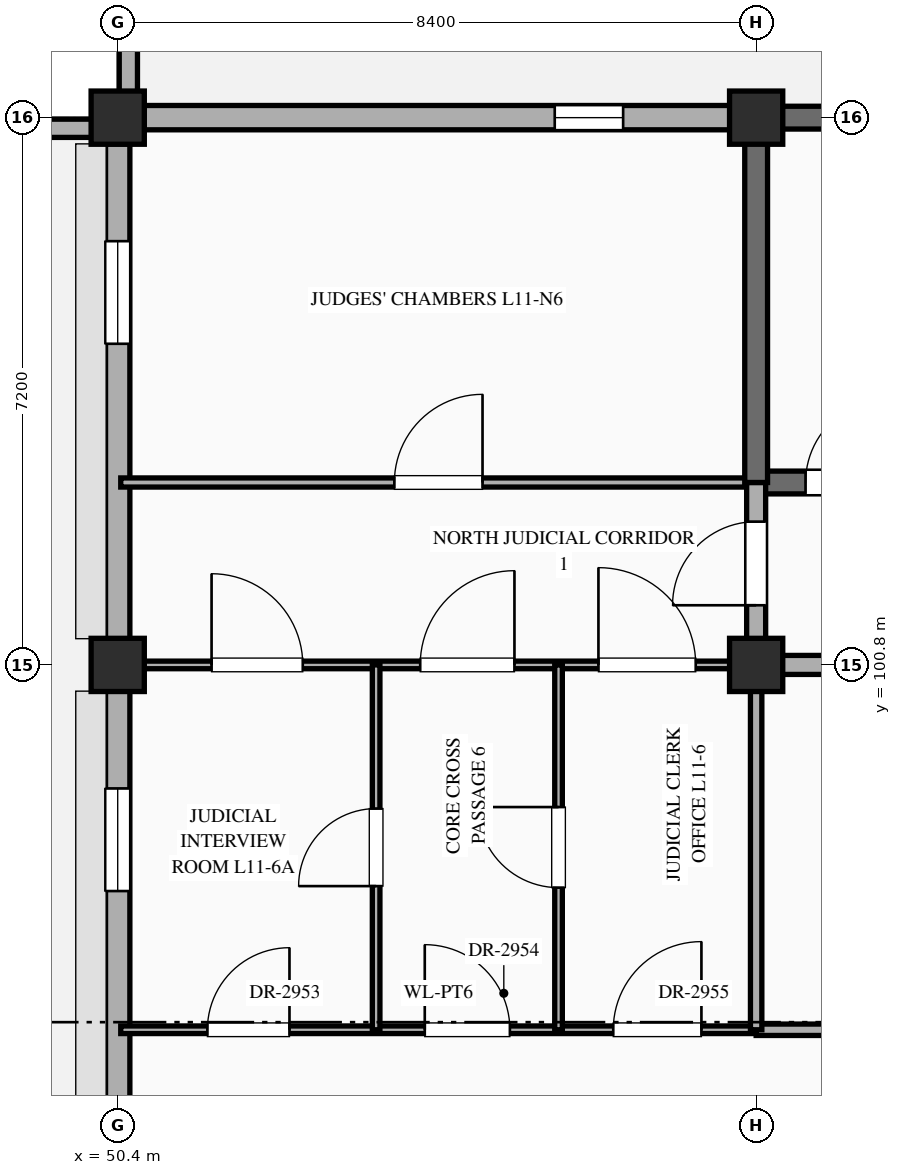
"""IFC4 building model, lengths in metres.
Left out: names, types, materials, properties, quantities, classifications, styles, units other than length and angle.
Written with IfcOpenShell. Run it as: python <this file> out.ifc"""

import sys

from ifc_helpers import new_model, si_unit, direction, frame, frame_2d, origin, origin_2d, place, context, subcontext, project, spatial, rectangle, extrude, element, fill, save


model = new_model("IFC4")
c1 = context("Model", 3, precision=1e-05, world=origin(), true_north=direction((0.0, 1.0)))
c2 = subcontext(c1, "Body", "Model", "MODEL_VIEW")
j1 = project(units=[si_unit("LENGTHUNIT", "METRE"), si_unit("PLANEANGLEUNIT", "RADIAN")], contexts=[c1])
p1 = place(None, origin())
s1 = spatial("IfcSite", under=j1, at=p1, CompositionType="ELEMENT")
p2 = place(p1, origin())
s2 = spatial("IfcBuilding", under=s1, at=p2, CompositionType="ELEMENT")
p3 = place(p2, frame((0.0, 0.0, 47.7)))
s3 = spatial("IfcBuildingStorey", under=s2, at=p3, CompositionType="ELEMENT", Elevation=47.7)
for number, where, z_axis, x_axis in (
    (1, (50.4, 100.8, 0.0), (0.0, 0.0, 1.0), (1.0, 0.0, 0.0)),
    (2, (50.4, 108.0, 0.0), (0.0, 0.0, 1.0), (1.0, 0.0, 0.0)),
    (3, (58.8, 100.8, 0.0), (0.0, 0.0, 1.0), (1.0, 0.0, 0.0)),
    (4, (58.8, 108.0, 0.0), (0.0, 0.0, 1.0), (1.0, 0.0, 0.0)),
):
    element("IfcColumn", number, at=place(p3, frame(where, z_axis=z_axis, x_axis=x_axis)), inside=s3, PredefinedType="COLUMN", context=c2, shape_type="SweptSolid", body=[
        extrude(rectangle(XDim=0.7, YDim=0.7, at=origin_2d()), origin(), (0.0, 0.0, 1.0), 4.2),
    ])
p4 = place(p3, frame((50.4, 93.945, 0.0), z_axis=(0.0, 0.0, 1.0), x_axis=(0.0, 1.0, 0.0)))
e5 = element("IfcWall", 5, at=p4, inside=s3, PredefinedType="STANDARD", context=c2, shape_type="SweptSolid", body=[
    extrude(rectangle(XDim=6.51, YDim=0.32, at=frame_2d((3.255, 0.0))), origin(), (0.0, 0.0, 1.0), 3.31),
])
p5 = place(p4, frame((3.88, 0.0, 0.55)))
e6 = element("IfcOpeningElement", 6, at=p5, cuts=e5, PredefinedType="OPENING", context=c2, shape_type="SweptSolid", body=[
    extrude(rectangle(XDim=1.35, YDim=1.2, at=frame_2d((0.675, 0.6))), frame((0.0, 0.172, 0.0), z_axis=(0.0, -1.0, 0.0), x_axis=(1.0, 0.0, 0.0)), (0.0, 0.0, 1.0), 0.344),
])
p6 = place(p3, frame((50.745, 108.0, 0.0), z_axis=(0.0, 0.0, 1.0), x_axis=(1.0, 0.0, 0.0)))
e7 = element("IfcWall", 7, at=p6, inside=s3, PredefinedType="STANDARD", context=c2, shape_type="SweptSolid", body=[
    extrude(rectangle(XDim=7.71, YDim=0.32, at=frame_2d((3.855, 0.0))), origin(), (0.0, 0.0, 1.0), 3.31),
])
p7 = place(p6, frame((5.405, 0.0, 0.55)))
e8 = element("IfcOpeningElement", 8, at=p7, cuts=e7, PredefinedType="OPENING", context=c2, shape_type="SweptSolid", body=[
    extrude(rectangle(XDim=0.9, YDim=1.38, at=frame_2d((0.45, 0.69))), frame((0.0, 0.172, 0.0), z_axis=(0.0, -1.0, 0.0), x_axis=(1.0, 0.0, 0.0)), (0.0, 0.0, 1.0), 0.344),
])
p8 = place(p3, frame((50.4, 101.145, 0.0), z_axis=(0.0, 0.0, 1.0), x_axis=(0.0, 1.0, 0.0)))
e9 = element("IfcWall", 9, at=p8, inside=s3, PredefinedType="STANDARD", context=c2, shape_type="SweptSolid", body=[
    extrude(rectangle(XDim=6.51, YDim=0.32, at=frame_2d((3.255, 0.0))), origin(), (0.0, 0.0, 1.0), 3.31),
])
p9 = place(p8, frame((3.88, 0.0, 0.55)))
e10 = element("IfcOpeningElement", 10, at=p9, cuts=e9, PredefinedType="OPENING", context=c2, shape_type="SweptSolid", body=[
    extrude(rectangle(XDim=1.35, YDim=1.38, at=frame_2d((0.675, 0.69))), frame((0.0, 0.172, 0.0), z_axis=(0.0, -1.0, 0.0), x_axis=(1.0, 0.0, 0.0)), (0.0, 0.0, 1.0), 0.344),
])
p10 = place(p3, frame((59.145, 108.0, 0.0), z_axis=(0.0, 0.0, 1.0), x_axis=(1.0, 0.0, 0.0)))
e11 = element("IfcWall", 11, at=p10, inside=s3, PredefinedType="SHEAR", context=c2, shape_type="SweptSolid", body=[
    extrude(rectangle(XDim=7.71, YDim=0.3, at=frame_2d((3.855, 0.0))), origin(), (0.0, 0.0, 1.0), 3.96),
])
p11 = place(p3, frame((50.1, 107.86, 0.0), z_axis=(0.0, 0.0, 1.0), x_axis=(-1.0, 0.0, 0.0)))
e12 = element("IfcWall", 12, at=p11, inside=s3, PredefinedType="PARAPET", context=c2, shape_type="SweptSolid", body=[
    extrude(rectangle(XDim=7.96, YDim=0.24, at=frame_2d((3.98, 0.0))), origin(), (0.0, 0.0, 1.0), 1.2),
])
p12 = place(p3, frame((50.54, 115.06, 0.0), z_axis=(0.0, 0.0, 1.0), x_axis=(0.0, -1.0, 0.0)))
e13 = element("IfcWall", 13, at=p12, inside=s3, PredefinedType="PARAPET", context=c2, shape_type="SweptSolid", body=[
    extrude(rectangle(XDim=6.76, YDim=0.24, at=frame_2d((3.38, 0.0))), origin(), (0.0, 0.0, 1.0), 1.2),
])
p13 = place(p3, frame((50.44, 96.0, 0.0), z_axis=(0.0, 0.0, 1.0), x_axis=(1.0, 0.0, 0.0)))
e14 = element("IfcWall", 14, at=p13, inside=s3, PredefinedType="STANDARD", context=c2, shape_type="SweptSolid", body=[
    extrude(rectangle(XDim=8.36, YDim=0.1, at=frame_2d((4.18, 0.0))), origin(), (0.0, 0.0, 1.0), 3.96),
])
p14 = place(p13, frame((1.14, 0.0, 0.0)))
e15 = element("IfcOpeningElement", 15, at=p14, cuts=e14, PredefinedType="OPENING", context=c2, shape_type="SweptSolid", body=[
    extrude(rectangle(XDim=1.08, YDim=2.25, at=frame_2d((0.54, 1.125))), frame((0.0, 0.062, 0.0), z_axis=(0.0, -1.0, 0.0), x_axis=(1.0, 0.0, 0.0)), (0.0, 0.0, 1.0), 0.124),
])
p15 = place(p13, frame((4.0, 0.0, 0.0)))
e16 = element("IfcOpeningElement", 16, at=p15, cuts=e14, PredefinedType="OPENING", context=c2, shape_type="SweptSolid", body=[
    extrude(rectangle(XDim=1.12, YDim=2.25, at=frame_2d((0.56, 1.125))), frame((0.0, 0.062, 0.0), z_axis=(0.0, -1.0, 0.0), x_axis=(1.0, 0.0, 0.0)), (0.0, 0.0, 1.0), 0.124),
])
p16 = place(p13, frame((6.48, 0.0, 0.0)))
e17 = element("IfcOpeningElement", 17, at=p16, cuts=e14, PredefinedType="OPENING", context=c2, shape_type="SweptSolid", body=[
    extrude(rectangle(XDim=1.16, YDim=2.3, at=frame_2d((0.58, 1.15))), frame((0.0, 0.062, 0.0), z_axis=(0.0, -1.0, 0.0), x_axis=(1.0, 0.0, 0.0)), (0.0, 0.0, 1.0), 0.124),
])
p17 = place(p3, frame((58.8, 96.0, 0.0), z_axis=(0.0, 0.0, 1.0), x_axis=(1.0, 0.0, 0.0)))
e18 = element("IfcWall", 18, at=p17, inside=s3, PredefinedType="STANDARD", context=c2, shape_type="SweptSolid", body=[
    extrude(rectangle(XDim=25.2, YDim=0.15, at=frame_2d((12.6, 0.0))), origin(), (0.0, 0.0, 1.0), 3.96),
])
p18 = place(p17, frame((3.6, 0.0, 0.0)))
e19 = element("IfcOpeningElement", 19, at=p18, cuts=e18, PredefinedType="OPENING", context=c2, shape_type="SweptSolid", body=[
    extrude(rectangle(XDim=1.2, YDim=2.35, at=frame_2d((0.6, 1.175))), frame((0.0, 0.087, 0.0), z_axis=(0.0, -1.0, 0.0), x_axis=(1.0, 0.0, 0.0)), (0.0, 0.0, 1.0), 0.174),
])
p19 = place(p17, frame((11.98, 0.0, 0.0)))
e20 = element("IfcOpeningElement", 20, at=p19, cuts=e18, PredefinedType="OPENING", context=c2, shape_type="SweptSolid", body=[
    extrude(rectangle(XDim=1.24, YDim=2.3, at=frame_2d((0.62, 1.15))), frame((0.0, 0.087, 0.0), z_axis=(0.0, -1.0, 0.0), x_axis=(1.0, 0.0, 0.0)), (0.0, 0.0, 1.0), 0.174),
])
p20 = place(p17, frame((20.36, 0.0, 0.0)))
e21 = element("IfcOpeningElement", 21, at=p20, cuts=e18, PredefinedType="OPENING", context=c2, shape_type="SweptSolid", body=[
    extrude(rectangle(XDim=1.28, YDim=2.35, at=frame_2d((0.64, 1.175))), frame((0.0, 0.087, 0.0), z_axis=(0.0, -1.0, 0.0), x_axis=(1.0, 0.0, 0.0)), (0.0, 0.0, 1.0), 0.174),
])
p21 = place(p3, frame((50.44, 100.8, 0.0), z_axis=(0.0, 0.0, 1.0), x_axis=(1.0, 0.0, 0.0)))
e22 = element("IfcWall", 22, at=p21, inside=s3, PredefinedType="STANDARD", context=c2, shape_type="SweptSolid", body=[
    extrude(rectangle(XDim=8.36, YDim=0.1, at=frame_2d((4.18, 0.0))), origin(), (0.0, 0.0, 1.0), 3.11),
])
p22 = place(p21, frame((1.195, 0.0, 0.0)))
e23 = element("IfcOpeningElement", 23, at=p22, cuts=e22, PredefinedType="OPENING", context=c2, shape_type="SweptSolid", body=[
    extrude(rectangle(XDim=1.2, YDim=2.35, at=frame_2d((0.6, 1.175))), frame((0.0, 0.062, 0.0), z_axis=(0.0, -1.0, 0.0), x_axis=(1.0, 0.0, 0.0)), (0.0, 0.0, 1.0), 0.124),
])
p23 = place(p21, frame((3.94, 0.0, 0.0)))
e24 = element("IfcOpeningElement", 24, at=p23, cuts=e22, PredefinedType="OPENING", context=c2, shape_type="SweptSolid", body=[
    extrude(rectangle(XDim=1.24, YDim=2.3, at=frame_2d((0.62, 1.15))), frame((0.0, 0.062, 0.0), z_axis=(0.0, -1.0, 0.0), x_axis=(1.0, 0.0, 0.0)), (0.0, 0.0, 1.0), 0.124),
])
p24 = place(p21, frame((6.285, 0.0, 0.0)))
e25 = element("IfcOpeningElement", 25, at=p24, cuts=e22, PredefinedType="OPENING", context=c2, shape_type="SweptSolid", body=[
    extrude(rectangle(XDim=1.28, YDim=2.35, at=frame_2d((0.64, 1.175))), frame((0.0, 0.062, 0.0), z_axis=(0.0, -1.0, 0.0), x_axis=(1.0, 0.0, 0.0)), (0.0, 0.0, 1.0), 0.124),
])
p25 = place(p3, frame((58.8, 100.8, 0.0), z_axis=(0.0, 0.0, 1.0), x_axis=(1.0, 0.0, 0.0)))
e26 = element("IfcWall", 26, at=p25, inside=s3, PredefinedType="STANDARD", context=c2, shape_type="SweptSolid", body=[
    extrude(rectangle(XDim=12.6, YDim=0.25, at=frame_2d((6.3, 0.0))), origin(), (0.0, 0.0, 1.0), 3.11),
])
p26 = place(p25, frame((3.7, 0.0, 0.0)))
e27 = element("IfcOpeningElement", 27, at=p26, cuts=e26, PredefinedType="OPENING", context=c2, shape_type="SweptSolid", body=[
    extrude(rectangle(XDim=1.0, YDim=2.2, at=frame_2d((0.5, 1.1))), frame((0.0, 0.137, 0.0), z_axis=(0.0, -1.0, 0.0), x_axis=(1.0, 0.0, 0.0)), (0.0, 0.0, 1.0), 0.274),
])
p27 = place(p3, frame((50.44, 103.2, 0.0), z_axis=(0.0, 0.0, 1.0), x_axis=(1.0, 0.0, 0.0)))
e28 = element("IfcWall", 28, at=p27, inside=s3, PredefinedType="STANDARD", context=c2, shape_type="SweptSolid", body=[
    extrude(rectangle(XDim=8.36, YDim=0.12, at=frame_2d((4.18, 0.0))), origin(), (0.0, 0.0, 1.0), 3.96),
])
p28 = place(p27, frame((3.6, 0.0, 0.0)))
e29 = element("IfcOpeningElement", 29, at=p28, cuts=e28, PredefinedType="OPENING", context=c2, shape_type="SweptSolid", body=[
    extrude(rectangle(XDim=1.16, YDim=2.3, at=frame_2d((0.58, 1.15))), frame((0.0, 0.072, 0.0), z_axis=(0.0, -1.0, 0.0), x_axis=(1.0, 0.0, 0.0)), (0.0, 0.0, 1.0), 0.144),
])
p29 = place(p3, frame((58.8, 103.2, 0.0), z_axis=(0.0, 0.0, 1.0), x_axis=(1.0, 0.0, 0.0)))
e30 = element("IfcWall", 30, at=p29, inside=s3, PredefinedType="SHEAR", context=c2, shape_type="SweptSolid", body=[
    extrude(rectangle(XDim=8.4, YDim=0.3, at=frame_2d((4.2, 0.0))), origin(), (0.0, 0.0, 1.0), 3.96),
])
p30 = place(p29, frame((0.65, 0.0, 0.0)))
e31 = element("IfcOpeningElement", 31, at=p30, cuts=e30, PredefinedType="OPENING", context=c2, shape_type="SweptSolid", body=[
    extrude(rectangle(XDim=1.1, YDim=2.2, at=frame_2d((0.55, 1.1))), frame((0.0, 0.162, 0.0), z_axis=(0.0, -1.0, 0.0), x_axis=(1.0, 0.0, 0.0)), (0.0, 0.0, 1.0), 0.324),
])
p31 = place(p3, frame((53.8, 96.0, 0.0), z_axis=(0.0, 0.0, 1.0), x_axis=(0.0, 1.0, 0.0)))
e32 = element("IfcWall", 32, at=p31, inside=s3, PredefinedType="STANDARD", context=c2, shape_type="SweptSolid", body=[
    extrude(rectangle(XDim=4.8, YDim=0.1, at=frame_2d((2.4, 0.0))), origin(), (0.0, 0.0, 1.0), 3.96),
])
p32 = place(p31, frame((1.89, 0.0, 0.0)))
e33 = element("IfcOpeningElement", 33, at=p32, cuts=e32, PredefinedType="OPENING", context=c2, shape_type="SweptSolid", body=[
    extrude(rectangle(XDim=1.02, YDim=2.4, at=frame_2d((0.51, 1.2))), frame((0.0, 0.062, 0.0), z_axis=(0.0, -1.0, 0.0), x_axis=(1.0, 0.0, 0.0)), (0.0, 0.0, 1.0), 0.124),
])
p33 = place(p3, frame((56.2, 96.0, 0.0), z_axis=(0.0, 0.0, 1.0), x_axis=(0.0, 1.0, 0.0)))
e34 = element("IfcWall", 34, at=p33, inside=s3, PredefinedType="STANDARD", context=c2, shape_type="SweptSolid", body=[
    extrude(rectangle(XDim=4.8, YDim=0.1, at=frame_2d((2.4, 0.0))), origin(), (0.0, 0.0, 1.0), 3.96),
])
p34 = place(p33, frame((1.87, 0.0, 0.0)))
e35 = element("IfcOpeningElement", 35, at=p34, cuts=e34, PredefinedType="OPENING", context=c2, shape_type="SweptSolid", body=[
    extrude(rectangle(XDim=1.06, YDim=2.4, at=frame_2d((0.53, 1.2))), frame((0.0, 0.062, 0.0), z_axis=(0.0, -1.0, 0.0), x_axis=(1.0, 0.0, 0.0)), (0.0, 0.0, 1.0), 0.124),
])
p35 = place(p3, frame((58.8, 96.0, 0.0), z_axis=(0.0, 0.0, 1.0), x_axis=(0.0, 1.0, 0.0)))
e36 = element("IfcWall", 36, at=p35, inside=s3, PredefinedType="STANDARD", context=c2, shape_type="SweptSolid", body=[
    extrude(rectangle(XDim=4.8, YDim=0.15, at=frame_2d((2.4, 0.0))), origin(), (0.0, 0.0, 1.0), 3.21),
])
p36 = place(p3, frame((58.8, 100.8, 0.0), z_axis=(0.0, 0.0, 1.0), x_axis=(0.0, 1.0, 0.0)))
e37 = element("IfcWall", 37, at=p36, inside=s3, PredefinedType="STANDARD", context=c2, shape_type="SweptSolid", body=[
    extrude(rectangle(XDim=2.4, YDim=0.25, at=frame_2d((1.2, 0.0))), origin(), (0.0, 0.0, 1.0), 3.21),
])
p37 = place(p36, frame((0.785, 0.0, 0.0)))
e38 = element("IfcOpeningElement", 38, at=p37, cuts=e37, PredefinedType="OPENING", context=c2, shape_type="SweptSolid", body=[
    extrude(rectangle(XDim=1.1, YDim=2.2, at=frame_2d((0.55, 1.1))), frame((0.0, 0.137, 0.0), z_axis=(0.0, -1.0, 0.0), x_axis=(1.0, 0.0, 0.0)), (0.0, 0.0, 1.0), 0.274),
])
p38 = place(p3, frame((58.8, 103.2, 0.0), z_axis=(0.0, 0.0, 1.0), x_axis=(0.0, 1.0, 0.0)))
e39 = element("IfcWall", 39, at=p38, inside=s3, PredefinedType="SHEAR", context=c2, shape_type="SweptSolid", body=[
    extrude(rectangle(XDim=4.76, YDim=0.3, at=frame_2d((2.38, 0.0))), origin(), (0.0, 0.0, 1.0), 3.96),
])
p39 = place(p5, origin())
e40 = element("IfcWindow", 40, at=p39, inside=s3, PartitioningType="SINGLE_PANEL", PredefinedType="WINDOW", context=c2, shape_type="SweptSolid", body=[
    extrude(rectangle(XDim=1.35, YDim=1.2, at=frame_2d((0.675, 0.6))), frame((0.0, 0.03, 0.0), z_axis=(0.0, -1.0, 0.0), x_axis=(1.0, 0.0, 0.0)), (0.0, 0.0, 1.0), 0.06),
])
fill(e6, e40)
p40 = place(p7, origin())
e41 = element("IfcWindow", 41, at=p40, inside=s3, PartitioningType="SINGLE_PANEL", PredefinedType="WINDOW", context=c2, shape_type="SweptSolid", body=[
    extrude(rectangle(XDim=0.9, YDim=1.38, at=frame_2d((0.45, 0.69))), frame((0.0, 0.03, 0.0), z_axis=(0.0, -1.0, 0.0), x_axis=(1.0, 0.0, 0.0)), (0.0, 0.0, 1.0), 0.06),
])
fill(e8, e41)
p41 = place(p9, origin())
e42 = element("IfcWindow", 42, at=p41, inside=s3, PartitioningType="SINGLE_PANEL", PredefinedType="WINDOW", context=c2, shape_type="SweptSolid", body=[
    extrude(rectangle(XDim=1.35, YDim=1.38, at=frame_2d((0.675, 0.69))), frame((0.0, 0.03, 0.0), z_axis=(0.0, -1.0, 0.0), x_axis=(1.0, 0.0, 0.0)), (0.0, 0.0, 1.0), 0.06),
])
fill(e10, e42)
p42 = place(p30, origin())
e43 = element("IfcDoor", 43, at=p42, inside=s3, OperationType="SINGLE_SWING_RIGHT", PredefinedType="DOOR", context=c2, shape_type="SweptSolid", body=[
    extrude(rectangle(XDim=1.1, YDim=2.2, at=frame_2d((0.55, 1.1))), frame((0.0, 0.025, 0.0), z_axis=(0.0, -1.0, 0.0), x_axis=(1.0, 0.0, 0.0)), (0.0, 0.0, 1.0), 0.05),
])
fill(e31, e43)
p43 = place(p37, origin())
e44 = element("IfcDoor", 44, at=p43, inside=s3, OperationType="SINGLE_SWING_LEFT", PredefinedType="DOOR", context=c2, shape_type="SweptSolid", body=[
    extrude(rectangle(XDim=1.1, YDim=2.2, at=frame_2d((0.55, 1.1))), frame((0.0, 0.025, 0.0), z_axis=(0.0, -1.0, 0.0), x_axis=(1.0, 0.0, 0.0)), (0.0, 0.0, 1.0), 0.05),
])
fill(e38, e44)
p44 = place(p28, origin())
e45 = element("IfcDoor", 45, at=p44, inside=s3, OperationType="SINGLE_SWING_RIGHT", PredefinedType="DOOR", context=c2, shape_type="SweptSolid", body=[
    extrude(rectangle(XDim=1.16, YDim=2.3, at=frame_2d((0.58, 1.15))), frame((0.0, 0.025, 0.0), z_axis=(0.0, -1.0, 0.0), x_axis=(1.0, 0.0, 0.0)), (0.0, 0.0, 1.0), 0.05),
])
fill(e29, e45)
p45 = place(p22, origin())
e46 = element("IfcDoor", 46, at=p45, inside=s3, OperationType="SINGLE_SWING_LEFT", PredefinedType="DOOR", context=c2, shape_type="SweptSolid", body=[
    extrude(rectangle(XDim=1.2, YDim=2.35, at=frame_2d((0.6, 1.175))), frame((0.0, 0.025, 0.0), z_axis=(0.0, -1.0, 0.0), x_axis=(1.0, 0.0, 0.0)), (0.0, 0.0, 1.0), 0.05),
])
fill(e23, e46)
p46 = place(p23, origin())
e47 = element("IfcDoor", 47, at=p46, inside=s3, OperationType="SINGLE_SWING_RIGHT", PredefinedType="DOOR", context=c2, shape_type="SweptSolid", body=[
    extrude(rectangle(XDim=1.24, YDim=2.3, at=frame_2d((0.62, 1.15))), frame((0.0, 0.025, 0.0), z_axis=(0.0, -1.0, 0.0), x_axis=(1.0, 0.0, 0.0)), (0.0, 0.0, 1.0), 0.05),
])
fill(e24, e47)
p47 = place(p24, origin())
e48 = element("IfcDoor", 48, at=p47, inside=s3, OperationType="SINGLE_SWING_LEFT", PredefinedType="DOOR", context=c2, shape_type="SweptSolid", body=[
    extrude(rectangle(XDim=1.28, YDim=2.35, at=frame_2d((0.64, 1.175))), frame((0.0, 0.025, 0.0), z_axis=(0.0, -1.0, 0.0), x_axis=(1.0, 0.0, 0.0)), (0.0, 0.0, 1.0), 0.05),
])
fill(e25, e48)
p48 = place(p14, origin())
e49 = element("IfcDoor", 49, at=p48, inside=s3, OperationType="SINGLE_SWING_RIGHT", PredefinedType="DOOR", context=c2, shape_type="SweptSolid", body=[
    extrude(rectangle(XDim=1.08, YDim=2.25, at=frame_2d((0.54, 1.125))), frame((0.0, 0.025, 0.0), z_axis=(0.0, -1.0, 0.0), x_axis=(1.0, 0.0, 0.0)), (0.0, 0.0, 1.0), 0.05),
])
fill(e15, e49)
p49 = place(p15, origin())
e50 = element("IfcDoor", 50, at=p49, inside=s3, OperationType="SINGLE_SWING_LEFT", PredefinedType="DOOR", context=c2, shape_type="SweptSolid", body=[
    extrude(rectangle(XDim=1.12, YDim=2.25, at=frame_2d((0.56, 1.125))), frame((0.0, 0.025, 0.0), z_axis=(0.0, -1.0, 0.0), x_axis=(1.0, 0.0, 0.0)), (0.0, 0.0, 1.0), 0.05),
])
fill(e16, e50)
p50 = place(p16, origin())
e51 = element("IfcDoor", 51, at=p50, inside=s3, OperationType="SINGLE_SWING_RIGHT", PredefinedType="DOOR", context=c2, shape_type="SweptSolid", body=[
    extrude(rectangle(XDim=1.16, YDim=2.3, at=frame_2d((0.58, 1.15))), frame((0.0, 0.025, 0.0), z_axis=(0.0, -1.0, 0.0), x_axis=(1.0, 0.0, 0.0)), (0.0, 0.0, 1.0), 0.05),
])
fill(e17, e51)
p51 = place(p32, origin())
e52 = element("IfcDoor", 52, at=p51, inside=s3, OperationType="SINGLE_SWING_LEFT", PredefinedType="DOOR", context=c2, shape_type="SweptSolid", body=[
    extrude(rectangle(XDim=1.02, YDim=2.4, at=frame_2d((0.51, 1.2))), frame((0.0, 0.025, 0.0), z_axis=(0.0, -1.0, 0.0), x_axis=(1.0, 0.0, 0.0)), (0.0, 0.0, 1.0), 0.05),
])
fill(e33, e52)
p52 = place(p34, origin())
e53 = element("IfcDoor", 53, at=p52, inside=s3, OperationType="SINGLE_SWING_RIGHT", PredefinedType="DOOR", context=c2, shape_type="SweptSolid", body=[
    extrude(rectangle(XDim=1.06, YDim=2.4, at=frame_2d((0.53, 1.2))), frame((0.0, 0.025, 0.0), z_axis=(0.0, -1.0, 0.0), x_axis=(1.0, 0.0, 0.0)), (0.0, 0.0, 1.0), 0.05),
])
fill(e35, e53)
save(model, sys.argv[1])
